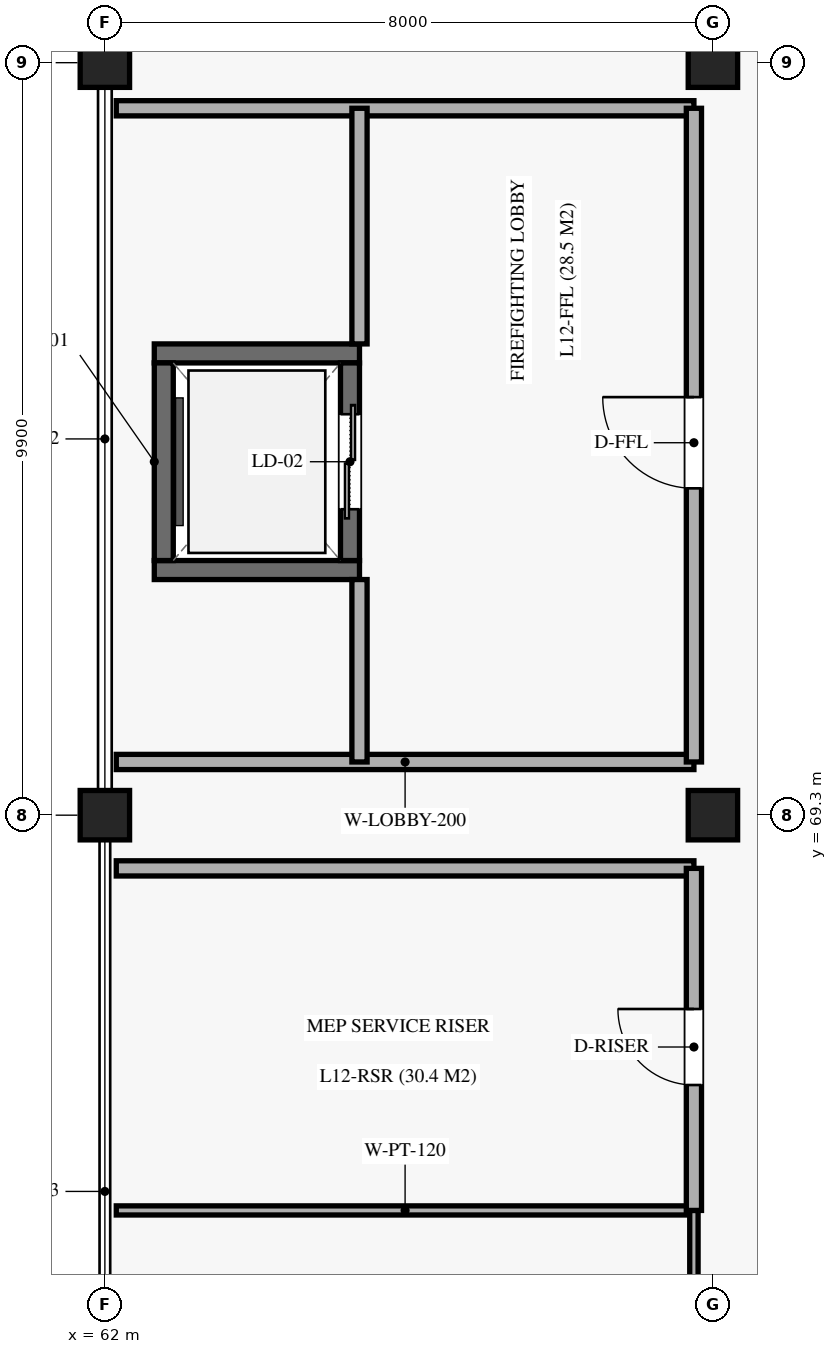
"""IFC4 building model, lengths in metres.
Left out: names, types, materials, properties, quantities, classifications, styles, units other than length and angle.
Written with IfcOpenShell. Run it as: python <this file> out.ifc"""

import sys

from ifc_helpers import new_model, si_unit, direction, frame, frame_2d, origin, origin_2d, place, context, subcontext, project, spatial, rectangle, extrude, element, fill, save


model = new_model("IFC4")
c1 = context("Model", 3, precision=1e-05, world=origin(), true_north=direction((0.0, 1.0)))
c2 = subcontext(c1, "Body", "Model", "MODEL_VIEW")
j1 = project(units=[si_unit("LENGTHUNIT", "METRE"), si_unit("PLANEANGLEUNIT", "RADIAN")], contexts=[c1])
p1 = place(None, origin())
s1 = spatial("IfcSite", under=j1, at=p1, CompositionType="ELEMENT")
p2 = place(p1, origin())
s2 = spatial("IfcBuilding", under=s1, at=p2, CompositionType="ELEMENT")
p3 = place(p2, frame((0.0, 0.0, 62.22)))
s3 = spatial("IfcBuildingStorey", under=s2, at=p3, CompositionType="ELEMENT", Elevation=62.22)
for number, where, z_axis, x_axis in (
    (1, (62.0, 69.3, 0.0), (0.0, 0.0, 1.0), (1.0, 0.0, 0.0)),
    (2, (62.0, 79.2, 0.0), (0.0, 0.0, 1.0), (1.0, 0.0, 0.0)),
    (3, (70.0, 69.3, 0.0), (0.0, 0.0, 1.0), (1.0, 0.0, 0.0)),
    (4, (70.0, 79.2, 0.0), (0.0, 0.0, 1.0), (1.0, 0.0, 0.0)),
):
    element("IfcColumn", number, at=place(p3, frame(where, z_axis=z_axis, x_axis=x_axis)), inside=s3, PredefinedType="COLUMN", context=c2, shape_type="SweptSolid", body=[
        extrude(rectangle(XDim=0.65, YDim=0.65, at=origin_2d()), origin(), (0.0, 0.0, 1.0), 4.08),
    ])
for number, where, z_axis, x_axis in (
    (5, (62.65, 72.525, 0.0), (0.0, 0.0, 1.0), (1.0, 0.0, 0.0)),
    (6, (62.65, 75.375, 0.0), (0.0, 0.0, 1.0), (1.0, 0.0, 0.0)),
):
    element("IfcWall", number, at=place(p3, frame(where, z_axis=z_axis, x_axis=x_axis)), inside=s3, PredefinedType="SOLIDWALL", context=c2, shape_type="SweptSolid", body=[
        extrude(rectangle(XDim=2.7, YDim=0.25, at=frame_2d((1.35, 0.0))), origin(), (0.0, 0.0, 1.0), 3.83),
    ])
p4 = place(p3, frame((62.775, 72.65, 0.0), z_axis=(0.0, 0.0, 1.0), x_axis=(0.0, 1.0, 0.0)))
e7 = element("IfcWall", 7, at=p4, inside=s3, PredefinedType="SOLIDWALL", context=c2, shape_type="SweptSolid", body=[
    extrude(rectangle(XDim=2.6, YDim=0.25, at=frame_2d((1.3, 0.0))), origin(), (0.0, 0.0, 1.0), 3.83),
])
p5 = place(p3, frame((65.225, 72.65, 0.0), z_axis=(0.0, 0.0, 1.0), x_axis=(0.0, 1.0, 0.0)))
e8 = element("IfcWall", 8, at=p5, inside=s3, PredefinedType="SOLIDWALL", context=c2, shape_type="SweptSolid", body=[
    extrude(rectangle(XDim=2.6, YDim=0.25, at=frame_2d((1.3, 0.0))), origin(), (0.0, 0.0, 1.0), 3.83),
])
p6 = place(p5, frame((0.675, 0.0, 0.0)))
e9 = element("IfcOpeningElement", 9, at=p6, cuts=e8, PredefinedType="OPENING", context=c2, shape_type="SweptSolid", body=[
    extrude(rectangle(XDim=1.25, YDim=2.2, at=frame_2d((0.625, 1.1))), frame((0.0, 0.135, 0.0), z_axis=(0.0, -1.0, 0.0), x_axis=(1.0, 0.0, 0.0)), (0.0, 0.0, 1.0), 0.27),
])
for number, where, z_axis, x_axis in (
    (10, (62.15, 70.0, 0.0), (0.0, 0.0, 1.0), (1.0, 0.0, 0.0)),
    (11, (62.15, 78.6, 0.0), (0.0, 0.0, 1.0), (1.0, 0.0, 0.0)),
):
    element("IfcWall", number, at=place(p3, frame(where, z_axis=z_axis, x_axis=x_axis)), inside=s3, PredefinedType="SOLIDWALL", context=c2, shape_type="SweptSolid", body=[
        extrude(rectangle(XDim=7.6, YDim=0.2, at=frame_2d((3.8, 0.0))), origin(), (0.0, 0.0, 1.0), 2.97),
    ])
p7 = place(p3, frame((65.35, 70.0, 0.0), z_axis=(0.0, 0.0, 1.0), x_axis=(0.0, 1.0, 0.0)))
e12 = element("IfcWall", 12, at=p7, inside=s3, PredefinedType="SOLIDWALL", context=c2, shape_type="SweptSolid", body=[
    extrude(rectangle(XDim=2.4, YDim=0.2, at=frame_2d((1.2, 0.0))), origin(), (0.0, 0.0, 1.0), 2.97),
])
p8 = place(p3, frame((65.35, 75.5, 0.0), z_axis=(0.0, 0.0, 1.0), x_axis=(0.0, 1.0, 0.0)))
e13 = element("IfcWall", 13, at=p8, inside=s3, PredefinedType="SOLIDWALL", context=c2, shape_type="SweptSolid", body=[
    extrude(rectangle(XDim=3.1, YDim=0.2, at=frame_2d((1.55, 0.0))), origin(), (0.0, 0.0, 1.0), 2.97),
])
p9 = place(p3, frame((69.75, 70.0, 0.0), z_axis=(0.0, 0.0, 1.0), x_axis=(0.0, 1.0, 0.0)))
e14 = element("IfcWall", 14, at=p9, inside=s3, PredefinedType="SOLIDWALL", context=c2, shape_type="SweptSolid", body=[
    extrude(rectangle(XDim=8.6, YDim=0.2, at=frame_2d((4.3, 0.0))), origin(), (0.0, 0.0, 1.0), 2.97),
])
p10 = place(p9, frame((3.6, 0.0, 0.0)))
e15 = element("IfcOpeningElement", 15, at=p10, cuts=e14, PredefinedType="OPENING", context=c2, shape_type="SweptSolid", body=[
    extrude(rectangle(XDim=1.2, YDim=2.25, at=frame_2d((0.6, 1.125))), frame((0.0, 0.11, 0.0), z_axis=(0.0, -1.0, 0.0), x_axis=(1.0, 0.0, 0.0)), (0.0, 0.0, 1.0), 0.22),
])
p11 = place(p3, frame((62.15, 64.1, 0.0), z_axis=(0.0, 0.0, 1.0), x_axis=(1.0, 0.0, 0.0)))
e16 = element("IfcWall", 16, at=p11, inside=s3, PredefinedType="PARTITIONING", context=c2, shape_type="SweptSolid", body=[
    extrude(rectangle(XDim=7.6, YDim=0.12, at=frame_2d((3.8, 0.0))), origin(), (0.0, 0.0, 1.0), 2.97),
])
p12 = place(p3, frame((69.75, 59.9, 0.0), z_axis=(0.0, 0.0, 1.0), x_axis=(0.0, 1.0, 0.0)))
e17 = element("IfcWall", 17, at=p12, inside=s3, PredefinedType="PARTITIONING", context=c2, shape_type="SweptSolid", body=[
    extrude(rectangle(XDim=4.2, YDim=0.11, at=frame_2d((2.1, 0.0))), origin(), (0.0, 0.0, 1.0), 2.97),
])
p13 = place(p12, frame((1.5, 0.0, 0.0)))
e18 = element("IfcOpeningElement", 18, at=p13, cuts=e17, PredefinedType="OPENING", context=c2, shape_type="SweptSolid", body=[
    extrude(rectangle(XDim=0.95, YDim=2.1, at=frame_2d((0.475, 1.05))), frame((0.0, 0.065, 0.0), z_axis=(0.0, -1.0, 0.0), x_axis=(1.0, 0.0, 0.0)), (0.0, 0.0, 1.0), 0.13),
])
p14 = place(p3, frame((62.15, 68.6, 0.0), z_axis=(0.0, 0.0, 1.0), x_axis=(1.0, 0.0, 0.0)))
e19 = element("IfcWall", 19, at=p14, inside=s3, PredefinedType="SOLIDWALL", context=c2, shape_type="SweptSolid", body=[
    extrude(rectangle(XDim=7.6, YDim=0.2, at=frame_2d((3.8, 0.0))), origin(), (0.0, 0.0, 1.0), 2.97),
])
p15 = place(p3, frame((69.75, 64.1, 0.0), z_axis=(0.0, 0.0, 1.0), x_axis=(0.0, 1.0, 0.0)))
e20 = element("IfcWall", 20, at=p15, inside=s3, PredefinedType="SOLIDWALL", context=c2, shape_type="SweptSolid", body=[
    extrude(rectangle(XDim=4.5, YDim=0.2, at=frame_2d((2.25, 0.0))), origin(), (0.0, 0.0, 1.0), 2.97),
])
p16 = place(p15, frame((1.65, 0.0, 0.0)))
e21 = element("IfcOpeningElement", 21, at=p16, cuts=e20, PredefinedType="OPENING", context=c2, shape_type="SweptSolid", body=[
    extrude(rectangle(XDim=1.0, YDim=2.15, at=frame_2d((0.5, 1.075))), frame((0.0, 0.11, 0.0), z_axis=(0.0, -1.0, 0.0), x_axis=(1.0, 0.0, 0.0)), (0.0, 0.0, 1.0), 0.22),
])
p17 = place(p6, origin())
e22 = element("IfcDoor", 22, at=p17, inside=s3, OperationType="DOUBLE_DOOR_SLIDING", PredefinedType="DOOR", context=c2, shape_type="SweptSolid", body=[
    extrude(rectangle(XDim=1.25, YDim=2.2, at=frame_2d((0.625, 1.1))), frame((0.0, 0.025, 0.0), z_axis=(0.0, -1.0, 0.0), x_axis=(1.0, 0.0, 0.0)), (0.0, 0.0, 1.0), 0.05),
])
fill(e9, e22)
p18 = place(p10, origin())
e23 = element("IfcDoor", 23, at=p18, inside=s3, OperationType="SINGLE_SWING_RIGHT", PredefinedType="DOOR", context=c2, shape_type="SweptSolid", body=[
    extrude(rectangle(XDim=1.2, YDim=2.25, at=frame_2d((0.6, 1.125))), frame((0.0, 0.025, 0.0), z_axis=(0.0, -1.0, 0.0), x_axis=(1.0, 0.0, 0.0)), (0.0, 0.0, 1.0), 0.05),
])
fill(e15, e23)
p19 = place(p16, origin())
e24 = element("IfcDoor", 24, at=p19, inside=s3, OperationType="SINGLE_SWING_RIGHT", PredefinedType="DOOR", context=c2, shape_type="SweptSolid", body=[
    extrude(rectangle(XDim=1.0, YDim=2.15, at=frame_2d((0.5, 1.075))), frame((0.0, 0.025, 0.0), z_axis=(0.0, -1.0, 0.0), x_axis=(1.0, 0.0, 0.0)), (0.0, 0.0, 1.0), 0.05),
])
fill(e21, e24)
save(model, sys.argv[1])
